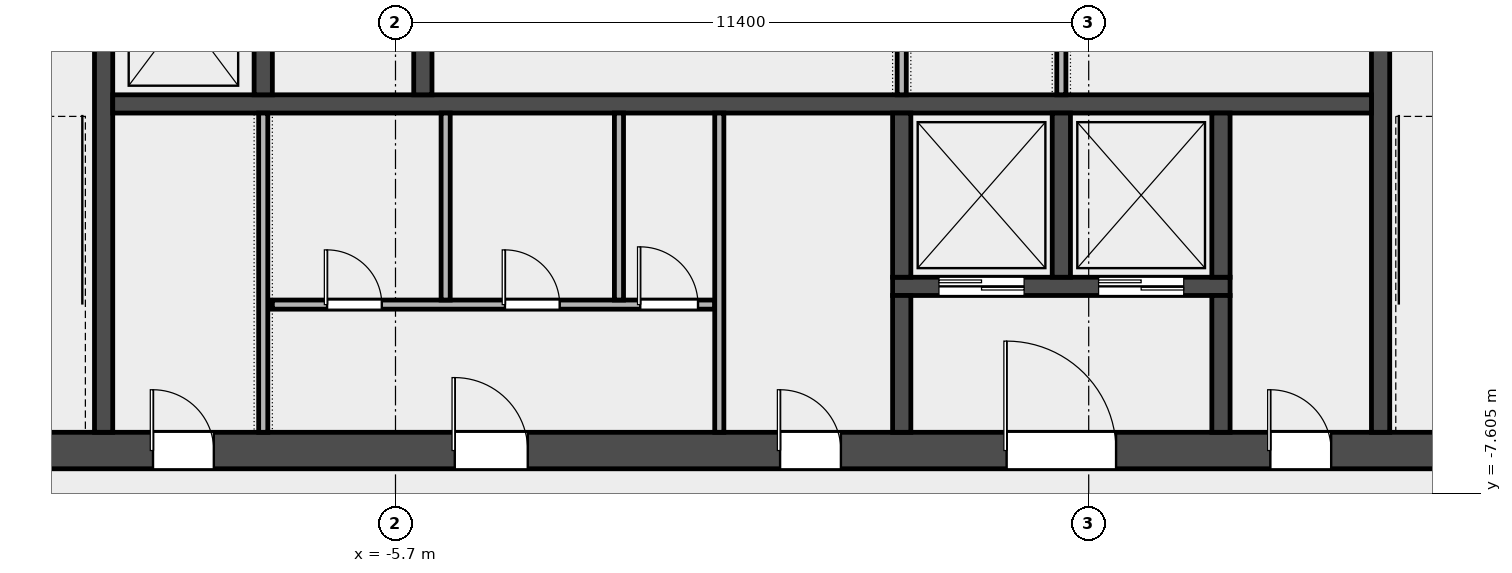
"""IFC4 building model, lengths in metres.
Left out: names, types, materials, properties, quantities, classifications, styles, units other than length and angle.
Written with IfcOpenShell. Run it as: python <this file> out.ifc"""

import sys

from ifc_helpers import new_model, si_unit, direction, frame, frame_2d, origin, place, context, subcontext, project, spatial, rectangle, extrude, element, fill, save


model = new_model("IFC4")
c1 = context("Model", 3, precision=1e-05, world=origin(), true_north=direction((0.0, 1.0)))
c2 = subcontext(c1, "Body", "Model", "MODEL_VIEW")
j1 = project(units=[si_unit("LENGTHUNIT", "METRE"), si_unit("PLANEANGLEUNIT", "RADIAN")], contexts=[c1])
p1 = place(None, origin())
s1 = spatial("IfcSite", under=j1, at=p1, CompositionType="ELEMENT")
p2 = place(p1, origin())
s2 = spatial("IfcBuilding", under=s1, at=p2, CompositionType="ELEMENT")
p3 = place(p2, frame((0.0, 0.0, 295.4)))
s3 = spatial("IfcBuildingStorey", under=s2, at=p3, CompositionType="ELEMENT", Elevation=295.4)
p4 = place(p3, frame((-14.4, -6.9, 0.0), z_axis=(0.0, 0.0, 1.0), x_axis=(1.0, 0.0, 0.0)))
e1 = element("IfcWall", 1, at=p4, inside=s3, PredefinedType="SHEAR", context=c2, shape_type="SweptSolid", body=[
    extrude(rectangle(XDim=28.8, YDim=0.6, at=frame_2d((14.4, 0.0))), origin(), (0.0, 0.0, 1.0), 3.7),
])
p5 = place(p4, frame((4.712, 0.0, 0.0)))
e2 = element("IfcOpeningElement", 2, at=p5, cuts=e1, PredefinedType="OPENING", context=c2, shape_type="SweptSolid", body=[
    extrude(rectangle(XDim=1.0, YDim=2.1, at=frame_2d((0.5, 1.05))), frame((0.0, 0.312, 0.0), z_axis=(0.0, -1.0, 0.0), x_axis=(1.0, 0.0, 0.0)), (0.0, 0.0, 1.0), 0.624),
])
p6 = place(p4, frame((9.675, 0.0, 0.0)))
e3 = element("IfcOpeningElement", 3, at=p6, cuts=e1, PredefinedType="OPENING", context=c2, shape_type="SweptSolid", body=[
    extrude(rectangle(XDim=1.2, YDim=2.1, at=frame_2d((0.6, 1.05))), frame((0.0, 0.312, 0.0), z_axis=(0.0, -1.0, 0.0), x_axis=(1.0, 0.0, 0.0)), (0.0, 0.0, 1.0), 0.624),
])
p7 = place(p4, frame((15.025, 0.0, 0.0)))
e4 = element("IfcOpeningElement", 4, at=p7, cuts=e1, PredefinedType="OPENING", context=c2, shape_type="SweptSolid", body=[
    extrude(rectangle(XDim=1.0, YDim=2.1, at=frame_2d((0.5, 1.05))), frame((0.0, 0.312, 0.0), z_axis=(0.0, -1.0, 0.0), x_axis=(1.0, 0.0, 0.0)), (0.0, 0.0, 1.0), 0.624),
])
p8 = place(p4, frame((18.75, 0.0, 0.0)))
e5 = element("IfcOpeningElement", 5, at=p8, cuts=e1, PredefinedType="OPENING", context=c2, shape_type="SweptSolid", body=[
    extrude(rectangle(XDim=1.8, YDim=2.1, at=frame_2d((0.9, 1.05))), frame((0.0, 0.312, 0.0), z_axis=(0.0, -1.0, 0.0), x_axis=(1.0, 0.0, 0.0)), (0.0, 0.0, 1.0), 0.624),
])
p9 = place(p4, frame((23.087, 0.0, 0.0)))
e6 = element("IfcOpeningElement", 6, at=p9, cuts=e1, PredefinedType="OPENING", context=c2, shape_type="SweptSolid", body=[
    extrude(rectangle(XDim=1.0, YDim=2.1, at=frame_2d((0.5, 1.05))), frame((0.0, 0.312, 0.0), z_axis=(0.0, -1.0, 0.0), x_axis=(1.0, 0.0, 0.0)), (0.0, 0.0, 1.0), 0.624),
])
for number, where, z_axis, x_axis in (
    (7, (-10.5, -6.6, 0.0), (0.0, 0.0, 1.0), (0.0, 1.0, 0.0)),
    (8, (10.5, -6.6, 0.0), (0.0, 0.0, 1.0), (0.0, 1.0, 0.0)),
):
    element("IfcWall", number, at=place(p3, frame(where, z_axis=z_axis, x_axis=x_axis)), inside=s3, PredefinedType="SHEAR", context=c2, shape_type="SweptSolid", body=[
        extrude(rectangle(XDim=8.55, YDim=0.3, at=frame_2d((4.275, 0.0))), origin(), (0.0, 0.0, 1.0), 3.7),
    ])
p10 = place(p3, frame((-10.35, -1.2, 0.0), z_axis=(0.0, 0.0, 1.0), x_axis=(1.0, 0.0, 0.0)))
e9 = element("IfcWall", 9, at=p10, inside=s3, PredefinedType="SOLIDWALL", context=c2, shape_type="SweptSolid", body=[
    extrude(rectangle(XDim=20.7, YDim=0.3, at=frame_2d((10.35, 0.0))), origin(), (0.0, 0.0, 1.0), 3.7),
])
for number, where, z_axis, x_axis in (
    (10, (-7.875, -1.05, 0.0), (0.0, 0.0, 1.0), (0.0, 1.0, 0.0)),
    (11, (-5.25, -1.05, 0.0), (0.0, 0.0, 1.0), (0.0, 1.0, 0.0)),
):
    element("IfcWall", number, at=place(p3, frame(where, z_axis=z_axis, x_axis=x_axis)), inside=s3, PredefinedType="SOLIDWALL", context=c2, shape_type="SweptSolid", body=[
        extrude(rectangle(XDim=2.7, YDim=0.3, at=frame_2d((1.35, 0.0))), origin(), (0.0, 0.0, 1.0), 3.7),
    ])
p11 = place(p3, frame((2.475, -4.2, 0.0), z_axis=(0.0, 0.0, 1.0), x_axis=(1.0, 0.0, 0.0)))
e12 = element("IfcWall", 12, at=p11, inside=s3, PredefinedType="SOLIDWALL", context=c2, shape_type="SweptSolid", body=[
    extrude(rectangle(XDim=5.55, YDim=0.3, at=frame_2d((2.775, 0.0))), origin(), (0.0, 0.0, 1.0), 3.7),
])
p12 = place(p11, frame((0.762, 0.0, 0.0)))
e13 = element("IfcOpeningElement", 13, at=p12, cuts=e12, PredefinedType="OPENING", context=c2, shape_type="SweptSolid", body=[
    extrude(rectangle(XDim=1.4, YDim=2.1, at=frame_2d((0.7, 1.05))), frame((0.0, 0.162, 0.0), z_axis=(0.0, -1.0, 0.0), x_axis=(1.0, 0.0, 0.0)), (0.0, 0.0, 1.0), 0.324),
])
p13 = place(p11, frame((3.387, 0.0, 0.0)))
e14 = element("IfcOpeningElement", 14, at=p13, cuts=e12, PredefinedType="OPENING", context=c2, shape_type="SweptSolid", body=[
    extrude(rectangle(XDim=1.4, YDim=2.1, at=frame_2d((0.7, 1.05))), frame((0.0, 0.162, 0.0), z_axis=(0.0, -1.0, 0.0), x_axis=(1.0, 0.0, 0.0)), (0.0, 0.0, 1.0), 0.324),
])
p14 = place(p3, frame((2.625, -4.05, 0.0), z_axis=(0.0, 0.0, 1.0), x_axis=(0.0, 1.0, 0.0)))
e15 = element("IfcWall", 15, at=p14, inside=s3, PredefinedType="SOLIDWALL", context=c2, shape_type="SweptSolid", body=[
    extrude(rectangle(XDim=2.7, YDim=0.3, at=frame_2d((1.35, 0.0))), origin(), (0.0, 0.0, 1.0), 3.7),
])
p15 = place(p3, frame((2.625, -6.6, 0.0), z_axis=(0.0, 0.0, 1.0), x_axis=(0.0, 1.0, 0.0)))
e16 = element("IfcWall", 16, at=p15, inside=s3, PredefinedType="SOLIDWALL", context=c2, shape_type="SweptSolid", body=[
    extrude(rectangle(XDim=2.25, YDim=0.3, at=frame_2d((1.125, 0.0))), origin(), (0.0, 0.0, 1.0), 3.7),
])
for number, where, z_axis, x_axis in (
    (17, (5.25, -4.05, 0.0), (0.0, 0.0, 1.0), (0.0, 1.0, 0.0)),
    (18, (7.875, -4.05, 0.0), (0.0, 0.0, 1.0), (0.0, 1.0, 0.0)),
):
    element("IfcWall", number, at=place(p3, frame(where, z_axis=z_axis, x_axis=x_axis)), inside=s3, PredefinedType="SOLIDWALL", context=c2, shape_type="SweptSolid", body=[
        extrude(rectangle(XDim=2.7, YDim=0.3, at=frame_2d((1.35, 0.0))), origin(), (0.0, 0.0, 1.0), 3.7),
    ])
p16 = place(p3, frame((7.875, -6.6, 0.0), z_axis=(0.0, 0.0, 1.0), x_axis=(0.0, 1.0, 0.0)))
e19 = element("IfcWall", 19, at=p16, inside=s3, PredefinedType="SOLIDWALL", context=c2, shape_type="SweptSolid", body=[
    extrude(rectangle(XDim=2.25, YDim=0.3, at=frame_2d((1.125, 0.0))), origin(), (0.0, 0.0, 1.0), 3.7),
])
p17 = place(p3, frame((-7.875, -6.6, 0.0), z_axis=(0.0, 0.0, 1.0), x_axis=(0.0, 1.0, 0.0)))
e20 = element("IfcWall", 20, at=p17, inside=s3, PredefinedType="PARTITIONING", context=c2, shape_type="SweptSolid", body=[
    extrude(rectangle(XDim=5.25, YDim=0.15, at=frame_2d((2.625, 0.0))), origin(), (0.0, 0.0, 1.0), 3.7),
])
p18 = place(p3, frame((-7.725, -4.5, 0.0), z_axis=(0.0, 0.0, 1.0), x_axis=(1.0, 0.0, 0.0)))
e21 = element("IfcWall", 21, at=p18, inside=s3, PredefinedType="PARTITIONING", context=c2, shape_type="SweptSolid", body=[
    extrude(rectangle(XDim=7.275, YDim=0.15, at=frame_2d((3.638, 0.0))), origin(), (0.0, 0.0, 1.0), 3.7),
])
p19 = place(p18, frame((0.9, 0.0, 0.0)))
e22 = element("IfcOpeningElement", 22, at=p19, cuts=e21, PredefinedType="OPENING", context=c2, shape_type="SweptSolid", body=[
    extrude(rectangle(XDim=0.9, YDim=2.1, at=frame_2d((0.45, 1.05))), frame((0.0, 0.087, 0.0), z_axis=(0.0, -1.0, 0.0), x_axis=(1.0, 0.0, 0.0)), (0.0, 0.0, 1.0), 0.174),
])
p20 = place(p18, frame((3.825, 0.0, 0.0)))
e23 = element("IfcOpeningElement", 23, at=p20, cuts=e21, PredefinedType="OPENING", context=c2, shape_type="SweptSolid", body=[
    extrude(rectangle(XDim=0.9, YDim=2.1, at=frame_2d((0.45, 1.05))), frame((0.0, 0.087, 0.0), z_axis=(0.0, -1.0, 0.0), x_axis=(1.0, 0.0, 0.0)), (0.0, 0.0, 1.0), 0.174),
])
p21 = place(p18, frame((6.05, 0.0, 0.0)))
e24 = element("IfcOpeningElement", 24, at=p21, cuts=e21, PredefinedType="OPENING", context=c2, shape_type="SweptSolid", body=[
    extrude(rectangle(XDim=0.95, YDim=2.1, at=frame_2d((0.475, 1.05))), frame((0.0, 0.087, 0.0), z_axis=(0.0, -1.0, 0.0), x_axis=(1.0, 0.0, 0.0)), (0.0, 0.0, 1.0), 0.174),
])
for number, where, z_axis, x_axis in (
    (25, (-4.875, -4.425, 0.0), (0.0, 0.0, 1.0), (0.0, 1.0, 0.0)),
    (26, (-2.025, -4.425, 0.0), (0.0, 0.0, 1.0), (0.0, 1.0, 0.0)),
):
    element("IfcWall", number, at=place(p3, frame(where, z_axis=z_axis, x_axis=x_axis)), inside=s3, PredefinedType="PARTITIONING", context=c2, shape_type="SweptSolid", body=[
        extrude(rectangle(XDim=3.075, YDim=0.15, at=frame_2d((1.538, 0.0))), origin(), (0.0, 0.0, 1.0), 3.7),
    ])
p22 = place(p3, frame((-0.375, -6.6, 0.0), z_axis=(0.0, 0.0, 1.0), x_axis=(0.0, 1.0, 0.0)))
e27 = element("IfcWall", 27, at=p22, inside=s3, PredefinedType="PARTITIONING", context=c2, shape_type="SweptSolid", body=[
    extrude(rectangle(XDim=5.25, YDim=0.15, at=frame_2d((2.625, 0.0))), origin(), (0.0, 0.0, 1.0), 3.7),
])
for number, where, z_axis, x_axis in (
    (28, (2.625, -1.05, 0.0), (0.0, 0.0, 1.0), (0.0, 1.0, 0.0)),
    (29, (5.25, -1.05, 0.0), (0.0, 0.0, 1.0), (0.0, 1.0, 0.0)),
):
    element("IfcWall", number, at=place(p3, frame(where, z_axis=z_axis, x_axis=x_axis)), inside=s3, PredefinedType="PARTITIONING", context=c2, shape_type="SweptSolid", body=[
        extrude(rectangle(XDim=2.7, YDim=0.15, at=frame_2d((1.35, 0.0))), origin(), (0.0, 0.0, 1.0), 3.7),
    ])
p23 = place(p12, origin())
e30 = element("IfcDoor", 30, at=p23, inside=s3, OperationType="DOUBLE_DOOR_SLIDING", PredefinedType="DOOR", context=c2, shape_type="SweptSolid", body=[
    extrude(rectangle(XDim=1.4, YDim=2.1, at=frame_2d((0.7, 1.05))), frame((0.0, 0.025, 0.0), z_axis=(0.0, -1.0, 0.0), x_axis=(1.0, 0.0, 0.0)), (0.0, 0.0, 1.0), 0.05),
])
fill(e13, e30)
p24 = place(p13, origin())
e31 = element("IfcDoor", 31, at=p24, inside=s3, OperationType="DOUBLE_DOOR_SLIDING", PredefinedType="DOOR", context=c2, shape_type="SweptSolid", body=[
    extrude(rectangle(XDim=1.4, YDim=2.1, at=frame_2d((0.7, 1.05))), frame((0.0, 0.025, 0.0), z_axis=(0.0, -1.0, 0.0), x_axis=(1.0, 0.0, 0.0)), (0.0, 0.0, 1.0), 0.05),
])
fill(e14, e31)
p25 = place(p5, origin())
e32 = element("IfcDoor", 32, at=p25, inside=s3, OperationType="SINGLE_SWING_LEFT", PredefinedType="DOOR", context=c2, shape_type="SweptSolid", body=[
    extrude(rectangle(XDim=1.0, YDim=2.1, at=frame_2d((0.5, 1.05))), frame((0.0, 0.025, 0.0), z_axis=(0.0, -1.0, 0.0), x_axis=(1.0, 0.0, 0.0)), (0.0, 0.0, 1.0), 0.05),
])
fill(e2, e32)
p26 = place(p6, origin())
e33 = element("IfcDoor", 33, at=p26, inside=s3, OperationType="SINGLE_SWING_LEFT", PredefinedType="DOOR", context=c2, shape_type="SweptSolid", body=[
    extrude(rectangle(XDim=1.2, YDim=2.1, at=frame_2d((0.6, 1.05))), frame((0.0, 0.025, 0.0), z_axis=(0.0, -1.0, 0.0), x_axis=(1.0, 0.0, 0.0)), (0.0, 0.0, 1.0), 0.05),
])
fill(e3, e33)
p27 = place(p19, origin())
e34 = element("IfcDoor", 34, at=p27, inside=s3, OperationType="SINGLE_SWING_LEFT", PredefinedType="DOOR", context=c2, shape_type="SweptSolid", body=[
    extrude(rectangle(XDim=0.9, YDim=2.1, at=frame_2d((0.45, 1.05))), frame((0.0, 0.025, 0.0), z_axis=(0.0, -1.0, 0.0), x_axis=(1.0, 0.0, 0.0)), (0.0, 0.0, 1.0), 0.05),
])
fill(e22, e34)
p28 = place(p20, origin())
e35 = element("IfcDoor", 35, at=p28, inside=s3, OperationType="SINGLE_SWING_LEFT", PredefinedType="DOOR", context=c2, shape_type="SweptSolid", body=[
    extrude(rectangle(XDim=0.9, YDim=2.1, at=frame_2d((0.45, 1.05))), frame((0.0, 0.025, 0.0), z_axis=(0.0, -1.0, 0.0), x_axis=(1.0, 0.0, 0.0)), (0.0, 0.0, 1.0), 0.05),
])
fill(e23, e35)
p29 = place(p21, origin())
e36 = element("IfcDoor", 36, at=p29, inside=s3, OperationType="SINGLE_SWING_LEFT", PredefinedType="DOOR", context=c2, shape_type="SweptSolid", body=[
    extrude(rectangle(XDim=0.95, YDim=2.1, at=frame_2d((0.475, 1.05))), frame((0.0, 0.025, 0.0), z_axis=(0.0, -1.0, 0.0), x_axis=(1.0, 0.0, 0.0)), (0.0, 0.0, 1.0), 0.05),
])
fill(e24, e36)
p30 = place(p7, origin())
e37 = element("IfcDoor", 37, at=p30, inside=s3, OperationType="SINGLE_SWING_LEFT", PredefinedType="DOOR", context=c2, shape_type="SweptSolid", body=[
    extrude(rectangle(XDim=1.0, YDim=2.1, at=frame_2d((0.5, 1.05))), frame((0.0, 0.025, 0.0), z_axis=(0.0, -1.0, 0.0), x_axis=(1.0, 0.0, 0.0)), (0.0, 0.0, 1.0), 0.05),
])
fill(e4, e37)
p31 = place(p8, origin())
e38 = element("IfcDoor", 38, at=p31, inside=s3, OperationType="DOUBLE_DOOR_SINGLE_SWING", PredefinedType="DOOR", context=c2, shape_type="SweptSolid", body=[
    extrude(rectangle(XDim=1.8, YDim=2.1, at=frame_2d((0.9, 1.05))), frame((0.0, 0.025, 0.0), z_axis=(0.0, -1.0, 0.0), x_axis=(1.0, 0.0, 0.0)), (0.0, 0.0, 1.0), 0.05),
])
fill(e5, e38)
p32 = place(p9, origin())
e39 = element("IfcDoor", 39, at=p32, inside=s3, OperationType="SINGLE_SWING_LEFT", PredefinedType="DOOR", context=c2, shape_type="SweptSolid", body=[
    extrude(rectangle(XDim=1.0, YDim=2.1, at=frame_2d((0.5, 1.05))), frame((0.0, 0.025, 0.0), z_axis=(0.0, -1.0, 0.0), x_axis=(1.0, 0.0, 0.0)), (0.0, 0.0, 1.0), 0.05),
])
fill(e6, e39)
save(model, sys.argv[1])
